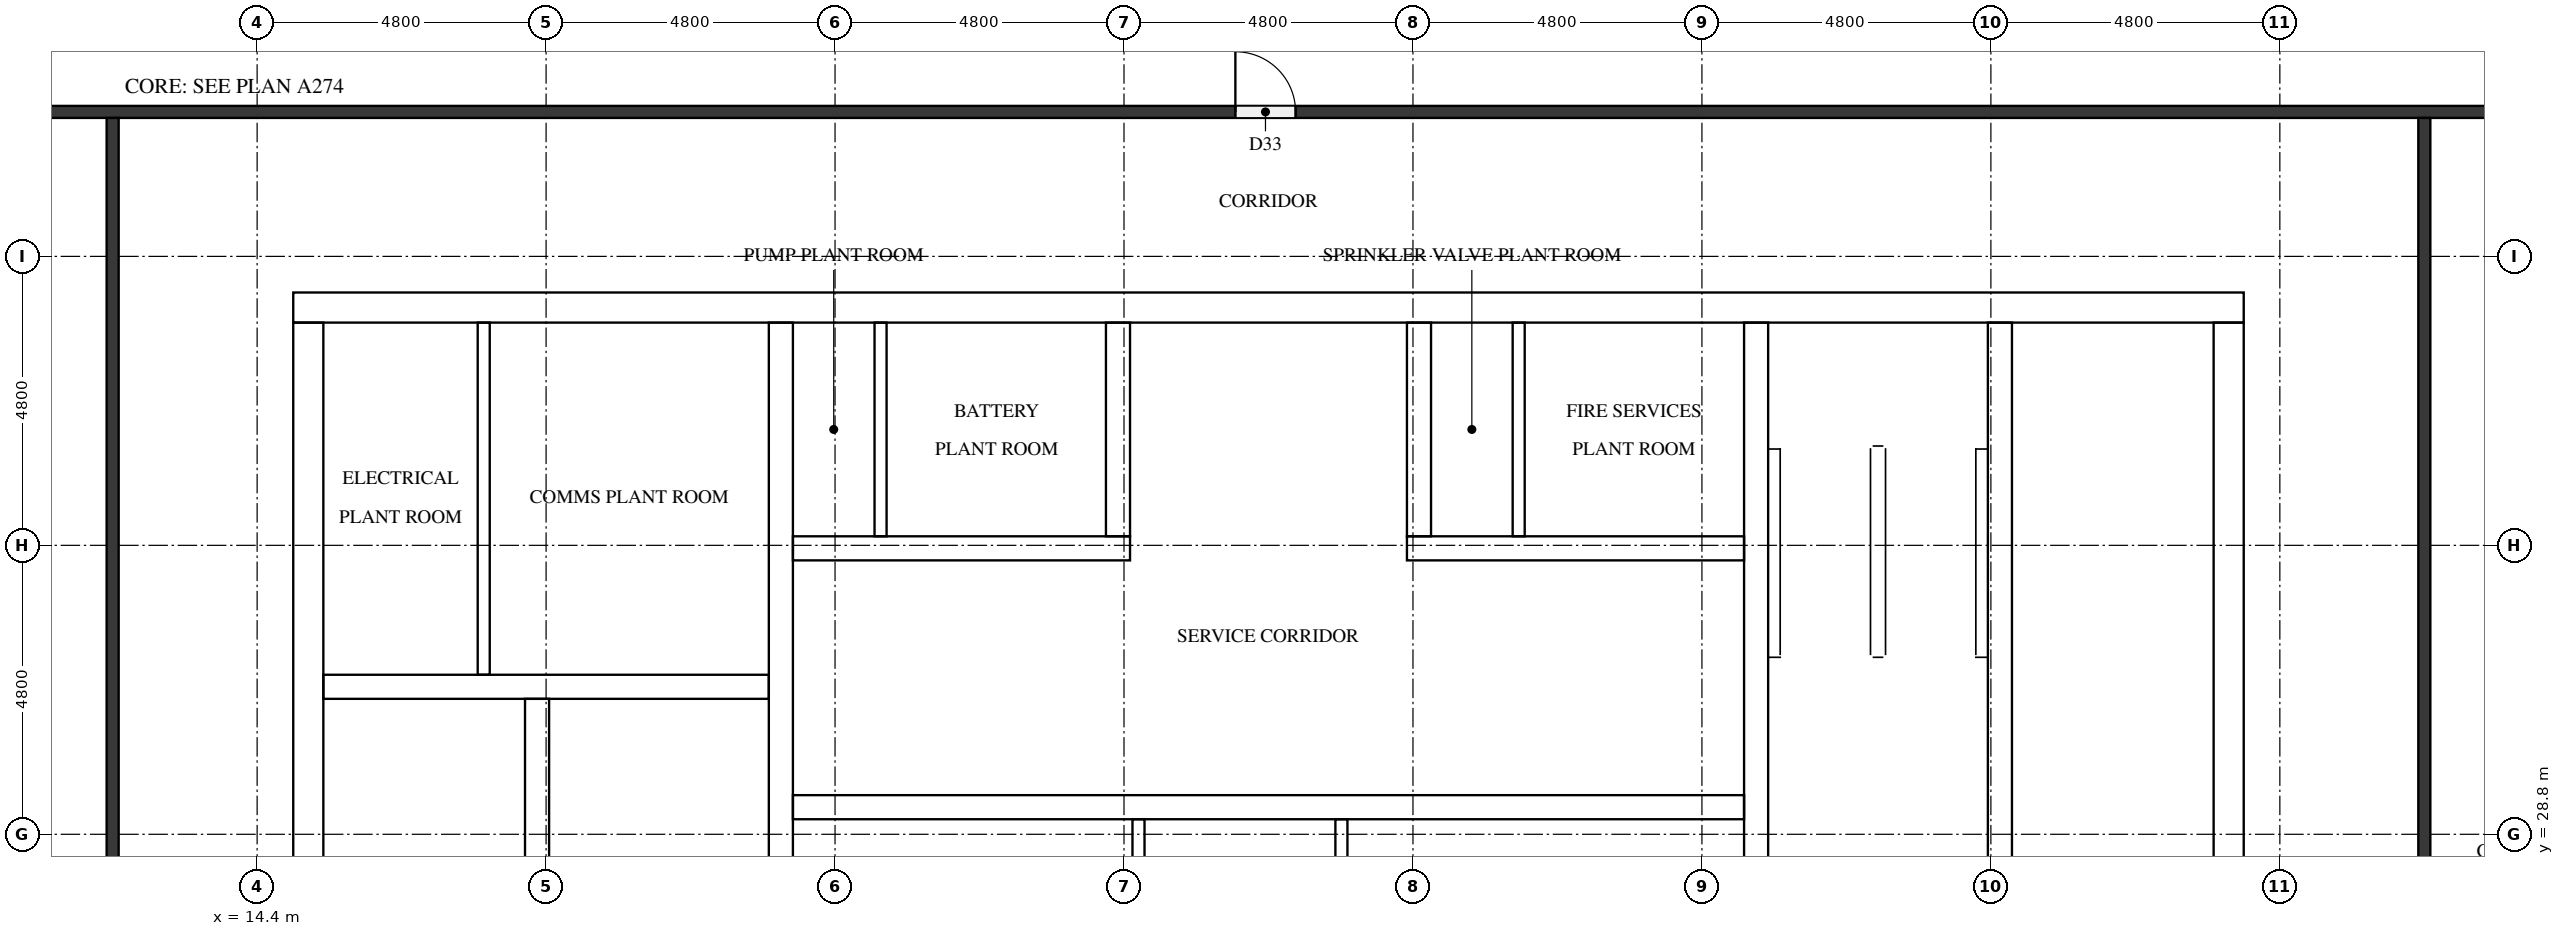
"""IFC4 building model, lengths in metres.
Left out: names, types, materials, properties, quantities, classifications, styles, units other than length and angle.
Written with IfcOpenShell. Run it as: python <this file> out.ifc"""

import sys

from ifc_helpers import new_model, si_unit, direction, frame, frame_2d, origin, place, context, subcontext, project, spatial, rectangle, extrude, element, fill, save


model = new_model("IFC4")
c1 = context("Model", 3, precision=1e-05, world=origin(), true_north=direction((0.0, 1.0)))
c2 = subcontext(c1, "Body", "Model", "MODEL_VIEW")
j1 = project(units=[si_unit("LENGTHUNIT", "METRE"), si_unit("PLANEANGLEUNIT", "RADIAN")], contexts=[c1])
p1 = place(None, origin())
s1 = spatial("IfcSite", under=j1, at=p1, CompositionType="ELEMENT")
p2 = place(p1, origin())
s2 = spatial("IfcBuilding", under=s1, at=p2, CompositionType="ELEMENT")
p3 = place(p2, frame((0.0, 0.0, 305.9)))
s3 = spatial("IfcBuildingStorey", under=s2, at=p3, CompositionType="ELEMENT", Elevation=305.9)
p4 = place(p3, frame((15.0, 37.55, 0.0), z_axis=(0.0, 0.0, 1.0), x_axis=(1.0, 0.0, 0.0)))
e1 = element("IfcWall", 1, at=p4, inside=s3, PredefinedType="SHEAR", context=c2, shape_type="SweptSolid", body=[
    extrude(rectangle(XDim=32.4, YDim=0.5, at=frame_2d((16.2, 0.0))), origin(), (0.0, 0.0, 1.0), 3.8),
])
p5 = place(p4, frame((15.3, 0.0, 0.0)))
e2 = element("IfcOpeningElement", 2, at=p5, cuts=e1, PredefinedType="OPENING", context=c2, shape_type="SweptSolid", body=[
    extrude(rectangle(XDim=1.8, YDim=2.1, at=frame_2d((0.9, 1.05))), frame((0.0, 0.26, 0.0), z_axis=(0.0, -1.0, 0.0), x_axis=(1.0, 0.0, 0.0)), (0.0, 0.0, 1.0), 0.52),
])
p6 = place(p4, frame((1.282, 0.0, 0.0)))
e3 = element("IfcOpeningElement", 3, at=p6, cuts=e1, PredefinedType="OPENING", context=c2, shape_type="SweptSolid", body=[
    extrude(rectangle(XDim=1.0, YDim=2.1, at=frame_2d((0.5, 1.05))), frame((0.0, 0.26, 0.0), z_axis=(0.0, -1.0, 0.0), x_axis=(1.0, 0.0, 0.0)), (0.0, 0.0, 1.0), 0.52),
])
p7 = place(p4, frame((5.082, 0.0, 0.0)))
e4 = element("IfcOpeningElement", 4, at=p7, cuts=e1, PredefinedType="OPENING", context=c2, shape_type="SweptSolid", body=[
    extrude(rectangle(XDim=1.0, YDim=2.1, at=frame_2d((0.5, 1.05))), frame((0.0, 0.26, 0.0), z_axis=(0.0, -1.0, 0.0), x_axis=(1.0, 0.0, 0.0)), (0.0, 0.0, 1.0), 0.52),
])
p8 = place(p3, frame((15.25, 15.5, 0.0), z_axis=(0.0, 0.0, 1.0), x_axis=(0.0, 1.0, 0.0)))
e5 = element("IfcWall", 5, at=p8, inside=s3, PredefinedType="SHEAR", context=c2, shape_type="SweptSolid", body=[
    extrude(rectangle(XDim=21.8, YDim=0.5, at=frame_2d((10.9, 0.0))), origin(), (0.0, 0.0, 1.0), 3.8),
])
p9 = place(p8, frame((5.26, 0.0, 0.0)))
e6 = element("IfcOpeningElement", 6, at=p9, cuts=e5, PredefinedType="OPENING", context=c2, shape_type="SweptSolid", body=[
    extrude(rectangle(XDim=1.2, YDim=2.1, at=frame_2d((0.6, 1.05))), frame((0.0, 0.26, 0.0), z_axis=(0.0, -1.0, 0.0), x_axis=(1.0, 0.0, 0.0)), (0.0, 0.0, 1.0), 0.52),
])
p10 = place(p3, frame((47.15, 15.5, 0.0), z_axis=(0.0, 0.0, 1.0), x_axis=(0.0, 1.0, 0.0)))
e7 = element("IfcWall", 7, at=p10, inside=s3, PredefinedType="SHEAR", context=c2, shape_type="SweptSolid", body=[
    extrude(rectangle(XDim=21.8, YDim=0.5, at=frame_2d((10.9, 0.0))), origin(), (0.0, 0.0, 1.0), 3.8),
])
p11 = place(p10, frame((10.6, 0.0, 0.0)))
e8 = element("IfcOpeningElement", 8, at=p11, cuts=e7, PredefinedType="OPENING", context=c2, shape_type="SweptSolid", body=[
    extrude(rectangle(XDim=1.2, YDim=2.1, at=frame_2d((0.6, 1.05))), frame((0.0, 0.26, 0.0), z_axis=(0.0, -1.0, 0.0), x_axis=(1.0, 0.0, 0.0)), (0.0, 0.0, 1.0), 0.52),
])
p12 = place(p3, frame((19.05, 15.5, 0.0), z_axis=(0.0, 0.0, 1.0), x_axis=(0.0, 1.0, 0.0)))
e9 = element("IfcWall", 9, at=p12, inside=s3, PredefinedType="SHEAR", context=c2, shape_type="SweptSolid", body=[
    extrude(rectangle(XDim=15.55, YDim=0.4, at=frame_2d((7.775, 0.0))), origin(), (0.0, 0.0, 1.0), 3.8),
])
p13 = place(p12, frame((9.95, 0.0, 0.0)))
e10 = element("IfcOpeningElement", 10, at=p13, cuts=e9, PredefinedType="OPENING", context=c2, shape_type="SweptSolid", body=[
    extrude(rectangle(XDim=1.1, YDim=2.1, at=frame_2d((0.55, 1.05))), frame((0.0, 0.21, 0.0), z_axis=(0.0, -1.0, 0.0), x_axis=(1.0, 0.0, 0.0)), (0.0, 0.0, 1.0), 0.42),
])
p14 = place(p12, frame((13.45, 0.0, 0.0)))
e11 = element("IfcOpeningElement", 11, at=p14, cuts=e9, PredefinedType="OPENING", context=c2, shape_type="SweptSolid", body=[
    extrude(rectangle(XDim=1.1, YDim=2.1, at=frame_2d((0.55, 1.05))), frame((0.0, 0.21, 0.0), z_axis=(0.0, -1.0, 0.0), x_axis=(1.0, 0.0, 0.0)), (0.0, 0.0, 1.0), 0.42),
])
p15 = place(p12, frame((0.7, 0.0, 0.0)))
e12 = element("IfcOpeningElement", 12, at=p15, cuts=e9, PredefinedType="OPENING", context=c2, shape_type="SweptSolid", body=[
    extrude(rectangle(XDim=1.2, YDim=2.1, at=frame_2d((0.6, 1.05))), frame((0.0, 0.21, 0.0), z_axis=(0.0, -1.0, 0.0), x_axis=(1.0, 0.0, 0.0)), (0.0, 0.0, 1.0), 0.42),
])
p16 = place(p3, frame((23.1, 15.5, 0.0), z_axis=(0.0, 0.0, 1.0), x_axis=(0.0, 1.0, 0.0)))
e13 = element("IfcWall", 13, at=p16, inside=s3, PredefinedType="SHEAR", context=c2, shape_type="SweptSolid", body=[
    extrude(rectangle(XDim=21.8, YDim=0.4, at=frame_2d((10.9, 0.0))), origin(), (0.0, 0.0, 1.0), 3.8),
])
p17 = place(p3, frame((39.3, 27.75, 0.0), z_axis=(0.0, 0.0, 1.0), x_axis=(0.0, 1.0, 0.0)))
e14 = element("IfcWall", 14, at=p17, inside=s3, PredefinedType="SHEAR", context=c2, shape_type="SweptSolid", body=[
    extrude(rectangle(XDim=9.55, YDim=0.4, at=frame_2d((4.775, 0.0))), origin(), (0.0, 0.0, 1.0), 3.8),
])
p18 = place(p3, frame((43.35, 27.75, 0.0), z_axis=(0.0, 0.0, 1.0), x_axis=(0.0, 1.0, 0.0)))
e15 = element("IfcWall", 15, at=p18, inside=s3, PredefinedType="SHEAR", context=c2, shape_type="SweptSolid", body=[
    extrude(rectangle(XDim=9.55, YDim=0.4, at=frame_2d((4.775, 0.0))), origin(), (0.0, 0.0, 1.0), 3.8),
])
p19 = place(p18, frame((7.65, 0.0, 0.0)))
e16 = element("IfcOpeningElement", 16, at=p19, cuts=e15, PredefinedType="OPENING", context=c2, shape_type="SweptSolid", body=[
    extrude(rectangle(XDim=1.2, YDim=2.1, at=frame_2d((0.6, 1.05))), frame((0.0, 0.21, 0.0), z_axis=(0.0, -1.0, 0.0), x_axis=(1.0, 0.0, 0.0)), (0.0, 0.0, 1.0), 0.42),
])
p20 = place(p3, frame((15.5, 31.25, 0.0), z_axis=(0.0, 0.0, 1.0), x_axis=(1.0, 0.0, 0.0)))
e17 = element("IfcWall", 17, at=p20, inside=s3, PredefinedType="SHEAR", context=c2, shape_type="SweptSolid", body=[
    extrude(rectangle(XDim=7.4, YDim=0.4, at=frame_2d((3.7, 0.0))), origin(), (0.0, 0.0, 1.0), 3.8),
])
p21 = place(p3, frame((23.3, 29.25, 0.0), z_axis=(0.0, 0.0, 1.0), x_axis=(1.0, 0.0, 0.0)))
e18 = element("IfcWall", 18, at=p21, inside=s3, PredefinedType="SHEAR", context=c2, shape_type="SweptSolid", body=[
    extrude(rectangle(XDim=15.8, YDim=0.4, at=frame_2d((7.9, 0.0))), origin(), (0.0, 0.0, 1.0), 3.8),
])
p22 = place(p21, frame((2.32, 0.0, 0.0)))
e19 = element("IfcOpeningElement", 19, at=p22, cuts=e18, PredefinedType="OPENING", context=c2, shape_type="SweptSolid", body=[
    extrude(rectangle(XDim=1.0, YDim=2.1, at=frame_2d((0.5, 1.05))), frame((0.0, 0.21, 0.0), z_axis=(0.0, -1.0, 0.0), x_axis=(1.0, 0.0, 0.0)), (0.0, 0.0, 1.0), 0.42),
])
p23 = place(p21, frame((6.926, 0.0, 0.0)))
e20 = element("IfcOpeningElement", 20, at=p23, cuts=e18, PredefinedType="OPENING", context=c2, shape_type="SweptSolid", body=[
    extrude(rectangle(XDim=1.0, YDim=2.1, at=frame_2d((0.5, 1.05))), frame((0.0, 0.21, 0.0), z_axis=(0.0, -1.0, 0.0), x_axis=(1.0, 0.0, 0.0)), (0.0, 0.0, 1.0), 0.42),
])
p24 = place(p21, frame((12.006, 0.0, 0.0)))
e21 = element("IfcOpeningElement", 21, at=p24, cuts=e18, PredefinedType="OPENING", context=c2, shape_type="SweptSolid", body=[
    extrude(rectangle(XDim=1.0, YDim=2.1, at=frame_2d((0.5, 1.05))), frame((0.0, 0.21, 0.0), z_axis=(0.0, -1.0, 0.0), x_axis=(1.0, 0.0, 0.0)), (0.0, 0.0, 1.0), 0.42),
])
p25 = place(p3, frame((23.3, 33.55, 0.0), z_axis=(0.0, 0.0, 1.0), x_axis=(1.0, 0.0, 0.0)))
e22 = element("IfcWall", 22, at=p25, inside=s3, PredefinedType="SHEAR", context=c2, shape_type="SweptSolid", body=[
    extrude(rectangle(XDim=5.6, YDim=0.4, at=frame_2d((2.8, 0.0))), origin(), (0.0, 0.0, 1.0), 3.8),
])
p26 = place(p25, frame((0.178, 0.0, 0.0)))
e23 = element("IfcOpeningElement", 23, at=p26, cuts=e22, PredefinedType="OPENING", context=c2, shape_type="SweptSolid", body=[
    extrude(rectangle(XDim=1.0, YDim=2.1, at=frame_2d((0.5, 1.05))), frame((0.0, 0.21, 0.0), z_axis=(0.0, -1.0, 0.0), x_axis=(1.0, 0.0, 0.0)), (0.0, 0.0, 1.0), 0.42),
])
p27 = place(p25, frame((2.878, 0.0, 0.0)))
e24 = element("IfcOpeningElement", 24, at=p27, cuts=e22, PredefinedType="OPENING", context=c2, shape_type="SweptSolid", body=[
    extrude(rectangle(XDim=1.0, YDim=2.1, at=frame_2d((0.5, 1.05))), frame((0.0, 0.21, 0.0), z_axis=(0.0, -1.0, 0.0), x_axis=(1.0, 0.0, 0.0)), (0.0, 0.0, 1.0), 0.42),
])
p28 = place(p3, frame((33.5, 33.55, 0.0), z_axis=(0.0, 0.0, 1.0), x_axis=(1.0, 0.0, 0.0)))
e25 = element("IfcWall", 25, at=p28, inside=s3, PredefinedType="SHEAR", context=c2, shape_type="SweptSolid", body=[
    extrude(rectangle(XDim=5.6, YDim=0.4, at=frame_2d((2.8, 0.0))), origin(), (0.0, 0.0, 1.0), 3.8),
])
p29 = place(p28, frame((0.578, 0.0, 0.0)))
e26 = element("IfcOpeningElement", 26, at=p29, cuts=e25, PredefinedType="OPENING", context=c2, shape_type="SweptSolid", body=[
    extrude(rectangle(XDim=1.0, YDim=2.1, at=frame_2d((0.5, 1.05))), frame((0.0, 0.21, 0.0), z_axis=(0.0, -1.0, 0.0), x_axis=(1.0, 0.0, 0.0)), (0.0, 0.0, 1.0), 0.42),
])
p30 = place(p28, frame((3.278, 0.0, 0.0)))
e27 = element("IfcOpeningElement", 27, at=p30, cuts=e25, PredefinedType="OPENING", context=c2, shape_type="SweptSolid", body=[
    extrude(rectangle(XDim=1.0, YDim=2.1, at=frame_2d((0.5, 1.05))), frame((0.0, 0.21, 0.0), z_axis=(0.0, -1.0, 0.0), x_axis=(1.0, 0.0, 0.0)), (0.0, 0.0, 1.0), 0.42),
])
for number, where, z_axis, x_axis in (
    (28, (28.7, 33.75, 0.0), (0.0, 0.0, 1.0), (0.0, 1.0, 0.0)),
    (29, (33.7, 33.75, 0.0), (0.0, 0.0, 1.0), (0.0, 1.0, 0.0)),
):
    element("IfcWall", number, at=place(p3, frame(where, z_axis=z_axis, x_axis=x_axis)), inside=s3, PredefinedType="SHEAR", context=c2, shape_type="SweptSolid", body=[
        extrude(rectangle(XDim=3.55, YDim=0.4, at=frame_2d((1.775, 0.0))), origin(), (0.0, 0.0, 1.0), 3.8),
    ])
p31 = place(p3, frame((18.164, 31.45, 0.0), z_axis=(0.0, 0.0, 1.0), x_axis=(0.0, 1.0, 0.0)))
e30 = element("IfcWall", 30, at=p31, inside=s3, PredefinedType="PARTITIONING", context=c2, shape_type="SweptSolid", body=[
    extrude(rectangle(XDim=5.85, YDim=0.2, at=frame_2d((2.925, 0.0))), origin(), (0.0, 0.0, 1.0), 3.8),
])
for number, where, z_axis, x_axis in (
    (31, (29.041, 26.35, 0.0), (0.0, 0.0, 1.0), (0.0, 1.0, 0.0)),
    (32, (32.411, 26.35, 0.0), (0.0, 0.0, 1.0), (0.0, 1.0, 0.0)),
):
    element("IfcWall", number, at=place(p3, frame(where, z_axis=z_axis, x_axis=x_axis)), inside=s3, PredefinedType="PARTITIONING", context=c2, shape_type="SweptSolid", body=[
        extrude(rectangle(XDim=2.7, YDim=0.2, at=frame_2d((1.35, 0.0))), origin(), (0.0, 0.0, 1.0), 3.8),
    ])
for number, where, z_axis, x_axis in (
    (33, (24.756, 33.75, 0.0), (0.0, 0.0, 1.0), (0.0, 1.0, 0.0)),
    (34, (35.356, 33.75, 0.0), (0.0, 0.0, 1.0), (0.0, 1.0, 0.0)),
):
    element("IfcWall", number, at=place(p3, frame(where, z_axis=z_axis, x_axis=x_axis)), inside=s3, PredefinedType="PARTITIONING", context=c2, shape_type="SweptSolid", body=[
        extrude(rectangle(XDim=3.55, YDim=0.2, at=frame_2d((1.775, 0.0))), origin(), (0.0, 0.0, 1.0), 3.8),
    ])
p32 = place(p3, frame((1.3, 40.8, 0.0), z_axis=(0.0, 0.0, 1.0), x_axis=(1.0, 0.0, 0.0)))
e35 = element("IfcWall", 35, at=p32, inside=s3, PredefinedType="PARTITIONING", context=c2, shape_type="SweptSolid", body=[
    extrude(rectangle(XDim=55.0, YDim=0.2, at=frame_2d((27.5, 0.0))), origin(), (0.0, 0.0, 1.0), 3.8),
])
p33 = place(p32, frame((29.35, 0.0, 0.0)))
e36 = element("IfcOpeningElement", 36, at=p33, cuts=e35, PredefinedType="OPENING", context=c2, shape_type="SweptSolid", body=[
    extrude(rectangle(XDim=1.0, YDim=2.1, at=frame_2d((0.5, 1.05))), frame((0.0, 0.11, 0.0), z_axis=(0.0, -1.0, 0.0), x_axis=(1.0, 0.0, 0.0)), (0.0, 0.0, 1.0), 0.22),
])
p34 = place(p3, frame((12.0, 12.1, 0.0), z_axis=(0.0, 0.0, 1.0), x_axis=(0.0, 1.0, 0.0)))
e37 = element("IfcWall", 37, at=p34, inside=s3, PredefinedType="PARTITIONING", context=c2, shape_type="SweptSolid", body=[
    extrude(rectangle(XDim=28.6, YDim=0.2, at=frame_2d((14.3, 0.0))), origin(), (0.0, 0.0, 1.0), 3.8),
])
p35 = place(p34, frame((13.75, 0.0, 0.0)))
e38 = element("IfcOpeningElement", 38, at=p35, cuts=e37, PredefinedType="OPENING", context=c2, shape_type="SweptSolid", body=[
    extrude(rectangle(XDim=1.0, YDim=2.1, at=frame_2d((0.5, 1.05))), frame((0.0, 0.11, 0.0), z_axis=(0.0, -1.0, 0.0), x_axis=(1.0, 0.0, 0.0)), (0.0, 0.0, 1.0), 0.22),
])
p36 = place(p3, frame((50.4, 40.7, 0.0), z_axis=(0.0, 0.0, 1.0), x_axis=(0.0, -1.0, 0.0)))
e39 = element("IfcWall", 39, at=p36, inside=s3, PredefinedType="PARTITIONING", context=c2, shape_type="SweptSolid", body=[
    extrude(rectangle(XDim=28.6, YDim=0.2, at=frame_2d((14.3, 0.0))), origin(), (0.0, 0.0, 1.0), 3.8),
])
p37 = place(p36, frame((13.75, 0.0, 0.0)))
e40 = element("IfcOpeningElement", 40, at=p37, cuts=e39, PredefinedType="OPENING", context=c2, shape_type="SweptSolid", body=[
    extrude(rectangle(XDim=1.0, YDim=2.1, at=frame_2d((0.5, 1.05))), frame((0.0, 0.11, 0.0), z_axis=(0.0, -1.0, 0.0), x_axis=(1.0, 0.0, 0.0)), (0.0, 0.0, 1.0), 0.22),
])
p38 = place(p14, origin())
e41 = element("IfcDoor", 41, at=p38, inside=s3, OperationType="DOUBLE_DOOR_SLIDING", PredefinedType="DOOR", context=c2, shape_type="SweptSolid", body=[
    extrude(rectangle(XDim=1.1, YDim=2.1, at=frame_2d((0.55, 1.05))), frame((0.0, 0.025, 0.0), z_axis=(0.0, -1.0, 0.0), x_axis=(1.0, 0.0, 0.0)), (0.0, 0.0, 1.0), 0.05),
])
fill(e11, e41)
p39 = place(p19, origin())
e42 = element("IfcDoor", 42, at=p39, inside=s3, OperationType="SINGLE_SWING_LEFT", PredefinedType="DOOR", context=c2, shape_type="SweptSolid", body=[
    extrude(rectangle(XDim=1.2, YDim=2.1, at=frame_2d((0.6, 1.05))), frame((0.0, 0.025, 0.0), z_axis=(0.0, -1.0, 0.0), x_axis=(1.0, 0.0, 0.0)), (0.0, 0.0, 1.0), 0.05),
])
fill(e16, e42)
p40 = place(p5, origin())
e43 = element("IfcDoor", 43, at=p40, inside=s3, OperationType="DOUBLE_DOOR_SINGLE_SWING", PredefinedType="DOOR", context=c2, shape_type="SweptSolid", body=[
    extrude(rectangle(XDim=1.8, YDim=2.1, at=frame_2d((0.9, 1.05))), frame((0.0, 0.025, 0.0), z_axis=(0.0, -1.0, 0.0), x_axis=(1.0, 0.0, 0.0)), (0.0, 0.0, 1.0), 0.05),
])
fill(e2, e43)
p41 = place(p6, origin())
e44 = element("IfcDoor", 44, at=p41, inside=s3, OperationType="SINGLE_SWING_RIGHT", PredefinedType="DOOR", context=c2, shape_type="SweptSolid", body=[
    extrude(rectangle(XDim=1.0, YDim=2.1, at=frame_2d((0.5, 1.05))), frame((0.0, 0.025, 0.0), z_axis=(0.0, -1.0, 0.0), x_axis=(1.0, 0.0, 0.0)), (0.0, 0.0, 1.0), 0.05),
])
fill(e3, e44)
p42 = place(p7, origin())
e45 = element("IfcDoor", 45, at=p42, inside=s3, OperationType="SINGLE_SWING_LEFT", PredefinedType="DOOR", context=c2, shape_type="SweptSolid", body=[
    extrude(rectangle(XDim=1.0, YDim=2.1, at=frame_2d((0.5, 1.05))), frame((0.0, 0.025, 0.0), z_axis=(0.0, -1.0, 0.0), x_axis=(1.0, 0.0, 0.0)), (0.0, 0.0, 1.0), 0.05),
])
fill(e4, e45)
p43 = place(p22, origin())
e46 = element("IfcDoor", 46, at=p43, inside=s3, OperationType="SINGLE_SWING_LEFT", PredefinedType="DOOR", context=c2, shape_type="SweptSolid", body=[
    extrude(rectangle(XDim=1.0, YDim=2.1, at=frame_2d((0.5, 1.05))), frame((0.0, 0.025, 0.0), z_axis=(0.0, -1.0, 0.0), x_axis=(1.0, 0.0, 0.0)), (0.0, 0.0, 1.0), 0.05),
])
fill(e19, e46)
p44 = place(p23, origin())
e47 = element("IfcDoor", 47, at=p44, inside=s3, OperationType="SINGLE_SWING_RIGHT", PredefinedType="DOOR", context=c2, shape_type="SweptSolid", body=[
    extrude(rectangle(XDim=1.0, YDim=2.1, at=frame_2d((0.5, 1.05))), frame((0.0, 0.025, 0.0), z_axis=(0.0, -1.0, 0.0), x_axis=(1.0, 0.0, 0.0)), (0.0, 0.0, 1.0), 0.05),
])
fill(e20, e47)
p45 = place(p24, origin())
e48 = element("IfcDoor", 48, at=p45, inside=s3, OperationType="SINGLE_SWING_LEFT", PredefinedType="DOOR", context=c2, shape_type="SweptSolid", body=[
    extrude(rectangle(XDim=1.0, YDim=2.1, at=frame_2d((0.5, 1.05))), frame((0.0, 0.025, 0.0), z_axis=(0.0, -1.0, 0.0), x_axis=(1.0, 0.0, 0.0)), (0.0, 0.0, 1.0), 0.05),
])
fill(e21, e48)
p46 = place(p26, frame((1.0, 0.0, 0.0), z_axis=(0.0, 0.0, 1.0), x_axis=(-1.0, 0.0, 0.0)))
e49 = element("IfcDoor", 49, at=p46, inside=s3, OperationType="SINGLE_SWING_RIGHT", PredefinedType="DOOR", context=c2, shape_type="SweptSolid", body=[
    extrude(rectangle(XDim=1.0, YDim=2.1, at=frame_2d((0.5, 1.05))), frame((0.0, 0.025, 0.0), z_axis=(0.0, -1.0, 0.0), x_axis=(1.0, 0.0, 0.0)), (0.0, 0.0, 1.0), 0.05),
])
fill(e23, e49)
p47 = place(p27, frame((1.0, 0.0, 0.0), z_axis=(0.0, 0.0, 1.0), x_axis=(-1.0, 0.0, 0.0)))
e50 = element("IfcDoor", 50, at=p47, inside=s3, OperationType="SINGLE_SWING_LEFT", PredefinedType="DOOR", context=c2, shape_type="SweptSolid", body=[
    extrude(rectangle(XDim=1.0, YDim=2.1, at=frame_2d((0.5, 1.05))), frame((0.0, 0.025, 0.0), z_axis=(0.0, -1.0, 0.0), x_axis=(1.0, 0.0, 0.0)), (0.0, 0.0, 1.0), 0.05),
])
fill(e24, e50)
p48 = place(p29, frame((1.0, 0.0, 0.0), z_axis=(0.0, 0.0, 1.0), x_axis=(-1.0, 0.0, 0.0)))
e51 = element("IfcDoor", 51, at=p48, inside=s3, OperationType="SINGLE_SWING_RIGHT", PredefinedType="DOOR", context=c2, shape_type="SweptSolid", body=[
    extrude(rectangle(XDim=1.0, YDim=2.1, at=frame_2d((0.5, 1.05))), frame((0.0, 0.025, 0.0), z_axis=(0.0, -1.0, 0.0), x_axis=(1.0, 0.0, 0.0)), (0.0, 0.0, 1.0), 0.05),
])
fill(e26, e51)
p49 = place(p30, frame((1.0, 0.0, 0.0), z_axis=(0.0, 0.0, 1.0), x_axis=(-1.0, 0.0, 0.0)))
e52 = element("IfcDoor", 52, at=p49, inside=s3, OperationType="SINGLE_SWING_LEFT", PredefinedType="DOOR", context=c2, shape_type="SweptSolid", body=[
    extrude(rectangle(XDim=1.0, YDim=2.1, at=frame_2d((0.5, 1.05))), frame((0.0, 0.025, 0.0), z_axis=(0.0, -1.0, 0.0), x_axis=(1.0, 0.0, 0.0)), (0.0, 0.0, 1.0), 0.05),
])
fill(e27, e52)
p50 = place(p33, origin())
e53 = element("IfcDoor", 53, at=p50, inside=s3, OperationType="SINGLE_SWING_LEFT", PredefinedType="DOOR", context=c2, shape_type="SweptSolid", body=[
    extrude(rectangle(XDim=1.0, YDim=2.1, at=frame_2d((0.5, 1.05))), frame((0.0, 0.025, 0.0), z_axis=(0.0, -1.0, 0.0), x_axis=(1.0, 0.0, 0.0)), (0.0, 0.0, 1.0), 0.05),
])
fill(e36, e53)
save(model, sys.argv[1])
